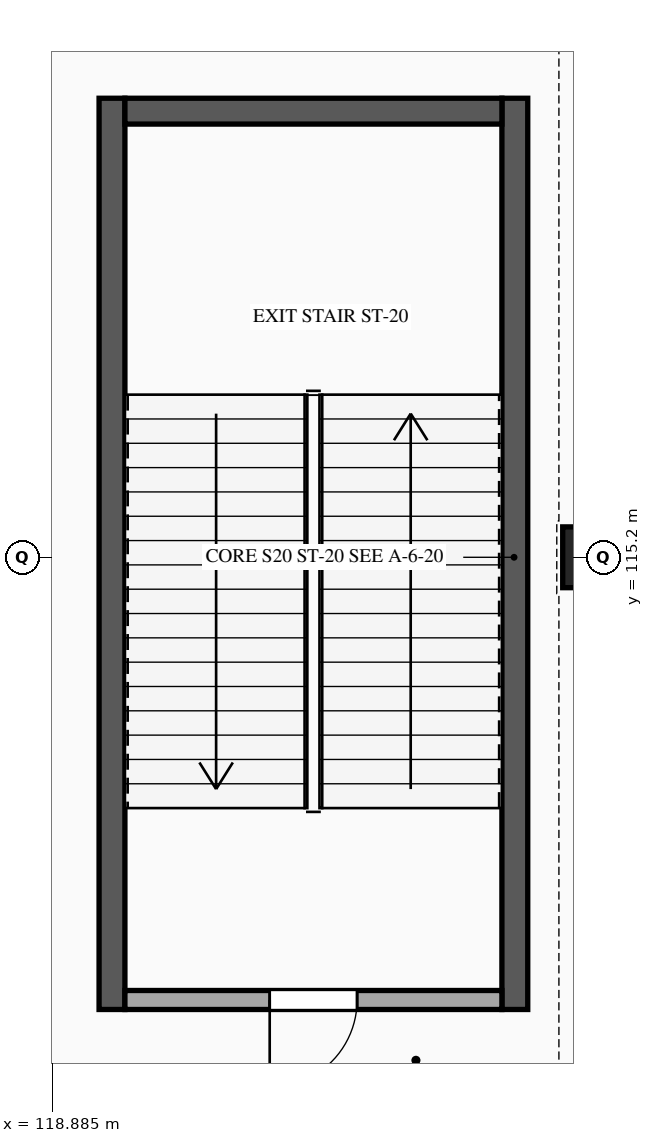
"""IFC4 building model, lengths in metres.
Left out: names, types, materials, properties, quantities, classifications, styles, units other than length and angle.
Written with IfcOpenShell. Run it as: python <this file> out.ifc"""

import sys

from ifc_helpers import new_model, si_unit, direction, frame, frame_2d, origin, origin_2d, place, context, subcontext, project, spatial, rectangle, extrude, element, fill, save


model = new_model("IFC4")
c1 = context("Model", 3, precision=1e-05, world=origin(), true_north=direction((0.0, 1.0)))
c2 = subcontext(c1, "Body", "Model", "MODEL_VIEW")
j1 = project(units=[si_unit("LENGTHUNIT", "METRE"), si_unit("PLANEANGLEUNIT", "RADIAN")], contexts=[c1])
p1 = place(None, origin())
s1 = spatial("IfcSite", under=j1, at=p1, CompositionType="ELEMENT")
p2 = place(p1, origin())
s2 = spatial("IfcBuilding", under=s1, at=p2, CompositionType="ELEMENT")
p3 = place(p2, origin())
s3 = spatial("IfcBuildingStorey", under=s2, at=p3, CompositionType="ELEMENT", Elevation=0.0)
p4 = place(p3, frame((126.0, 115.2, 0.0), z_axis=(0.0, 0.0, 1.0), x_axis=(1.0, 0.0, 0.0)))
e1 = element("IfcColumn", 1, at=p4, inside=s3, PredefinedType="COLUMN", context=c2, shape_type="SweptSolid", body=[
    extrude(rectangle(XDim=0.8, YDim=0.8, at=origin_2d()), origin(), (0.0, 0.0, 1.0), 5.4),
])
for number, where, z_axis, x_axis in (
    (2, (119.67, 109.25, 0.0), (0.0, 0.0, 1.0), (0.0, 1.0, 0.0)),
    (3, (124.97, 121.24, 0.0), (0.0, 0.0, 1.0), (0.0, -1.0, 0.0)),
):
    element("IfcWall", number, at=place(p3, frame(where, z_axis=z_axis, x_axis=x_axis)), inside=s3, PredefinedType="SHEAR", context=c2, shape_type="SweptSolid", body=[
        extrude(rectangle(XDim=11.99, YDim=0.34, at=frame_2d((5.995, 0.0))), origin(), (0.0, 0.0, 1.0), 5.12),
    ])
p5 = place(p3, frame((119.84, 121.07, 0.0), z_axis=(0.0, 0.0, 1.0), x_axis=(1.0, 0.0, 0.0)))
e4 = element("IfcWall", 4, at=p5, inside=s3, PredefinedType="SHEAR", context=c2, shape_type="SweptSolid", body=[
    extrude(rectangle(XDim=4.96, YDim=0.34, at=frame_2d((2.48, 0.0))), origin(), (0.0, 0.0, 1.0), 5.12),
])
p6 = place(p3, frame((124.8, 109.375, 0.0), z_axis=(0.0, 0.0, 1.0), x_axis=(-1.0, 0.0, 0.0)))
e5 = element("IfcWall", 5, at=p6, inside=s3, PredefinedType="STANDARD", context=c2, shape_type="SweptSolid", body=[
    extrude(rectangle(XDim=4.96, YDim=0.25, at=frame_2d((2.48, 0.0))), origin(), (0.0, 0.0, 1.0), 5.08),
])
p7 = place(p6, frame((1.905, 0.0, 0.0)))
e6 = element("IfcOpeningElement", 6, at=p7, cuts=e5, PredefinedType="OPENING", context=c2, shape_type="SweptSolid", body=[
    extrude(rectangle(XDim=1.15, YDim=2.2, at=frame_2d((0.575, 1.1))), frame((0.0, 0.135, 0.0), z_axis=(0.0, -1.0, 0.0), x_axis=(1.0, 0.0, 0.0)), (0.0, 0.0, 1.0), 0.27),
])
p8 = place(p7, origin())
e7 = element("IfcDoor", 7, at=p8, inside=s3, OperationType="SINGLE_SWING_RIGHT", PredefinedType="DOOR", context=c2, shape_type="SweptSolid", body=[
    extrude(rectangle(XDim=1.15, YDim=2.2, at=frame_2d((0.575, 1.1))), frame((0.0, 0.025, 0.0), z_axis=(0.0, -1.0, 0.0), x_axis=(1.0, 0.0, 0.0)), (0.0, 0.0, 1.0), 0.05),
])
fill(e6, e7)
save(model, sys.argv[1])
